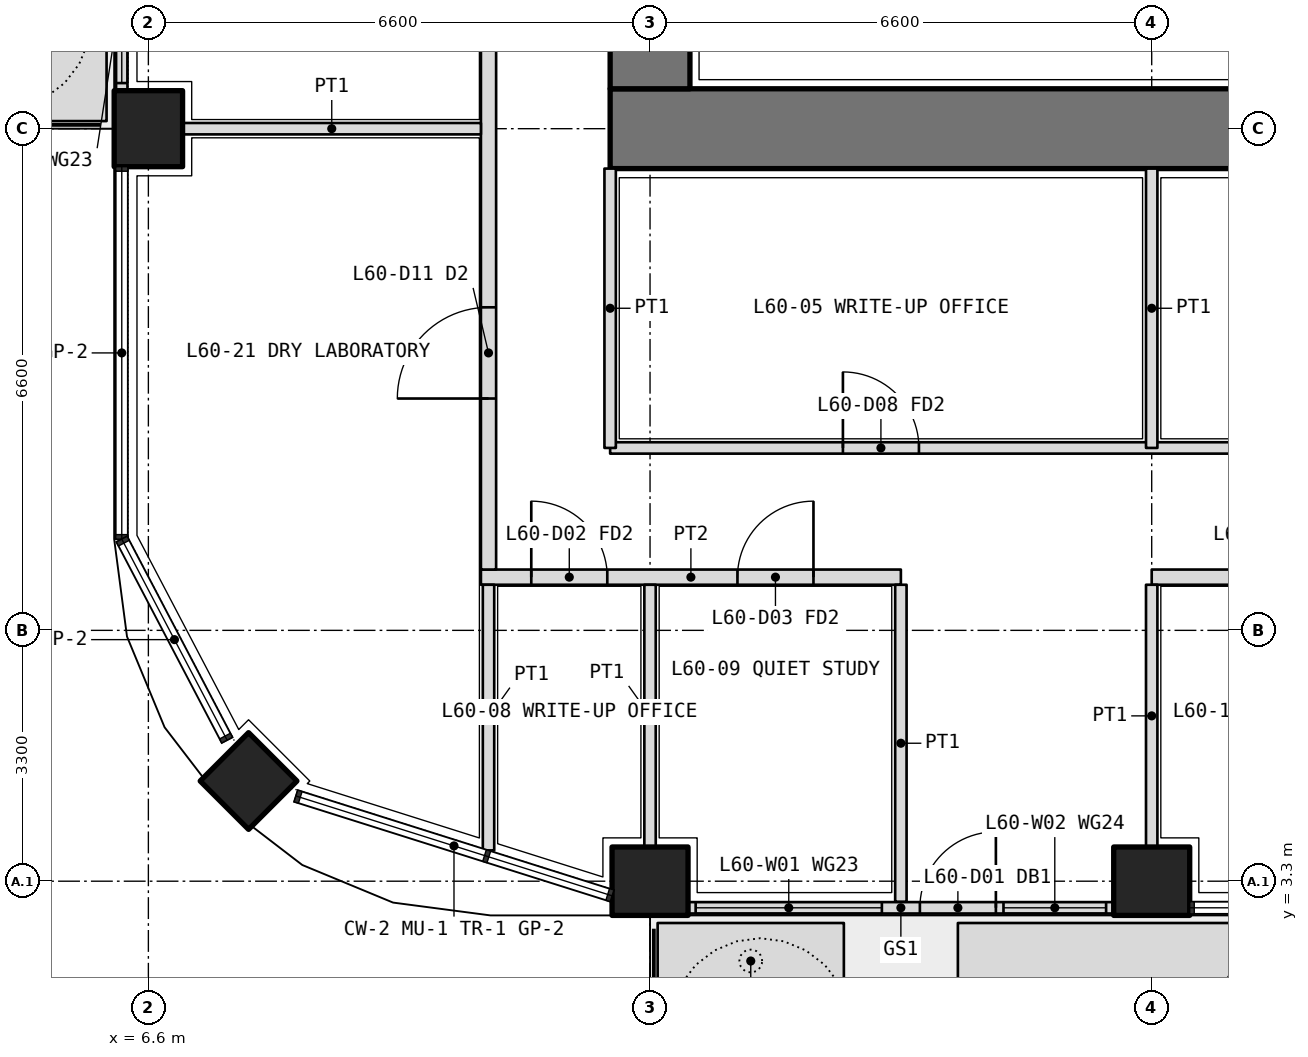
"""IFC4 building model, lengths in metres.
Left out: names, types, materials, properties, quantities, classifications, styles, units other than length and angle.
Written with IfcOpenShell. Run it as: python <this file> out.ifc"""

import sys

from ifc_helpers import new_model, si_unit, direction, frame, frame_2d, origin, origin_2d, place, context, subcontext, project, spatial, polyline, rectangle, outline, extrude, element, fill, save


model = new_model("IFC4")
c1 = context("Model", 3, precision=1e-05, world=origin(), true_north=direction((0.0, 1.0)))
c2 = subcontext(c1, "Body", "Model", "MODEL_VIEW")
j1 = project(units=[si_unit("LENGTHUNIT", "METRE"), si_unit("PLANEANGLEUNIT", "RADIAN")], contexts=[c1])
p1 = place(None, origin())
s1 = spatial("IfcSite", under=j1, at=p1, CompositionType="ELEMENT")
p2 = place(p1, origin())
s2 = spatial("IfcBuilding", under=s1, at=p2, CompositionType="ELEMENT")
p3 = place(p2, frame((0.0, 0.0, 262.8)))
s3 = spatial("IfcBuildingStorey", under=s2, at=p3, CompositionType="ELEMENT", Elevation=262.8)
p4 = place(p3, frame((7.918, 4.618, 0.0), z_axis=(0.0, 0.0, 1.0), x_axis=(0.707106781187, 0.707106781187, 0.0)))
e1 = element("IfcColumn", 1, at=p4, inside=s3, PredefinedType="COLUMN", context=c2, shape_type="SweptSolid", body=[
    extrude(rectangle(XDim=0.9, YDim=0.9, at=origin_2d()), origin(), (0.0, 0.0, 1.0), 4.2),
])
for number, where, z_axis, x_axis in (
    (2, (13.2, 3.3, 0.0), (0.0, 0.0, 1.0), (1.0, 0.0, 0.0)),
    (3, (19.8, 3.3, 0.0), (0.0, 0.0, 1.0), (1.0, 0.0, 0.0)),
    (4, (6.6, 13.2, 0.0), (0.0, 0.0, 1.0), (0.0, 1.0, 0.0)),
):
    element("IfcColumn", number, at=place(p3, frame(where, z_axis=z_axis, x_axis=x_axis)), inside=s3, PredefinedType="COLUMN", context=c2, shape_type="SweptSolid", body=[
        extrude(rectangle(XDim=1.0, YDim=0.9, at=origin_2d()), origin(), (0.0, 0.0, 1.0), 4.2),
    ])
p5 = place(p3, origin())
e5 = element("IfcWall", 5, at=p5, inside=s3, PredefinedType="USERDEFINED", context=c2, shape_type="SweptSolid", body=[
    extrude(outline(polyline([(13.3, 1.75), (15.75, 1.75), (15.75, 2.75), (13.3, 2.75), (13.3, 1.75)]), holes=[polyline([(13.45, 1.9), (15.6, 1.9), (15.6, 2.6), (13.45, 2.6), (13.45, 1.9)])]), origin(), (0.0, 0.0, 1.0), 1.05),
])
p6 = place(p3, origin())
e6 = element("IfcWall", 6, at=p6, inside=s3, PredefinedType="USERDEFINED", context=c2, shape_type="SweptSolid", body=[
    extrude(outline(polyline([(17.25, 1.75), (26.3, 1.75), (26.3, 2.75), (17.25, 2.75), (17.25, 1.75)]), holes=[polyline([(17.4, 1.9), (26.15, 1.9), (26.15, 2.6), (17.4, 2.6), (17.4, 1.9)])]), origin(), (0.0, 0.0, 1.0), 1.05),
])
p7 = place(p3, origin())
e7 = element("IfcWall", 7, at=p7, inside=s3, PredefinedType="USERDEFINED", context=c2, shape_type="SweptSolid", body=[
    extrude(outline(polyline([(5.05, 13.3), (6.05, 13.3), (6.05, 15.75), (5.05, 15.75), (5.05, 13.3)]), holes=[polyline([(5.2, 13.45), (5.9, 13.45), (5.9, 15.6), (5.2, 15.6), (5.2, 13.45)])]), origin(), (0.0, 0.0, 1.0), 1.05),
])
p8 = place(p3, frame((13.7, 2.95, 0.0), z_axis=(0.0, 0.0, 1.0), x_axis=(1.0, 0.0, 0.0)))
e8 = element("IfcWall", 8, at=p8, inside=s3, PredefinedType="SOLIDWALL", context=c2, shape_type="SweptSolid", body=[
    extrude(rectangle(XDim=5.6, YDim=0.15, at=frame_2d((2.8, 0.0))), origin(), (0.0, 0.0, 1.0), 2.7),
])
p9 = place(p8, frame((3.05, 0.0, 0.0)))
e9 = element("IfcOpeningElement", 9, at=p9, cuts=e8, PredefinedType="OPENING", context=c2, shape_type="SweptSolid", body=[
    extrude(rectangle(XDim=1.0, YDim=2.4, at=frame_2d((0.5, 1.2))), frame((0.0, 0.085, 0.0), z_axis=(0.0, -1.0, 0.0), x_axis=(1.0, 0.0, 0.0)), (0.0, 0.0, 1.0), 0.17),
])
p10 = place(p8, frame((0.1, 0.0, 0.1)))
e10 = element("IfcOpeningElement", 10, at=p10, cuts=e8, PredefinedType="OPENING", context=c2, shape_type="SweptSolid", body=[
    extrude(rectangle(XDim=2.45, YDim=2.3, at=frame_2d((1.225, 1.15))), frame((0.0, 0.085, 0.0), z_axis=(0.0, -1.0, 0.0), x_axis=(1.0, 0.0, 0.0)), (0.0, 0.0, 1.0), 0.17),
])
p11 = place(p8, frame((4.15, 0.0, 0.1)))
e11 = element("IfcOpeningElement", 11, at=p11, cuts=e8, PredefinedType="OPENING", context=c2, shape_type="SweptSolid", body=[
    extrude(rectangle(XDim=1.35, YDim=2.3, at=frame_2d((0.675, 1.15))), frame((0.0, 0.085, 0.0), z_axis=(0.0, -1.0, 0.0), x_axis=(1.0, 0.0, 0.0)), (0.0, 0.0, 1.0), 0.17),
])
p12 = place(p3, frame((6.25, 19.3, 0.0), z_axis=(0.0, 0.0, 1.0), x_axis=(0.0, -1.0, 0.0)))
e12 = element("IfcWall", 12, at=p12, inside=s3, PredefinedType="SOLIDWALL", context=c2, shape_type="SweptSolid", body=[
    extrude(rectangle(XDim=5.6, YDim=0.15, at=frame_2d((2.8, 0.0))), origin(), (0.0, 0.0, 1.0), 2.7),
])
p13 = place(p12, frame((1.55, 0.0, 0.0)))
e13 = element("IfcOpeningElement", 13, at=p13, cuts=e12, PredefinedType="OPENING", context=c2, shape_type="SweptSolid", body=[
    extrude(rectangle(XDim=1.0, YDim=2.4, at=frame_2d((0.5, 1.2))), frame((0.0, 0.085, 0.0), z_axis=(0.0, -1.0, 0.0), x_axis=(1.0, 0.0, 0.0)), (0.0, 0.0, 1.0), 0.17),
])
p14 = place(p12, frame((0.1, 0.0, 0.1)))
e14 = element("IfcOpeningElement", 14, at=p14, cuts=e12, PredefinedType="OPENING", context=c2, shape_type="SweptSolid", body=[
    extrude(rectangle(XDim=1.35, YDim=2.3, at=frame_2d((0.675, 1.15))), frame((0.0, 0.085, 0.0), z_axis=(0.0, -1.0, 0.0), x_axis=(1.0, 0.0, 0.0)), (0.0, 0.0, 1.0), 0.17),
])
p15 = place(p12, frame((3.05, 0.0, 0.1)))
e15 = element("IfcOpeningElement", 15, at=p15, cuts=e12, PredefinedType="OPENING", context=c2, shape_type="SweptSolid", body=[
    extrude(rectangle(XDim=2.45, YDim=2.3, at=frame_2d((1.225, 1.15))), frame((0.0, 0.085, 0.0), z_axis=(0.0, -1.0, 0.0), x_axis=(1.0, 0.0, 0.0)), (0.0, 0.0, 1.0), 0.17),
])
p16 = place(p3, frame((12.675, 13.2, 0.0), z_axis=(0.0, 0.0, 1.0), x_axis=(1.0, 0.0, 0.0)))
e16 = element("IfcWall", 16, at=p16, inside=s3, PredefinedType="SHEAR", context=c2, shape_type="SweptSolid", body=[
    extrude(rectangle(XDim=27.45, YDim=1.05, at=frame_2d((13.725, 0.0))), origin(), (0.0, 0.0, 1.0), 4.2),
])
p17 = place(p3, frame((13.2, 32.475, 0.0), z_axis=(0.0, 0.0, 1.0), x_axis=(0.0, -1.0, 0.0)))
e17 = element("IfcWall", 17, at=p17, inside=s3, PredefinedType="SHEAR", context=c2, shape_type="SweptSolid", body=[
    extrude(rectangle(XDim=18.75, YDim=1.05, at=frame_2d((9.375, 0.0))), origin(), (0.0, 0.0, 1.0), 4.2),
])
p18 = place(p17, frame((14.125, 0.0, 0.0)))
e18 = element("IfcOpeningElement", 18, at=p18, cuts=e17, PredefinedType="OPENING", context=c2, shape_type="SweptSolid", body=[
    extrude(rectangle(XDim=1.6, YDim=2.1, at=frame_2d((0.8, 1.05))), frame((0.0, 0.535, 0.0), z_axis=(0.0, -1.0, 0.0), x_axis=(1.0, 0.0, 0.0)), (0.0, 0.0, 1.0), 1.07),
])
p19 = place(p17, frame((3.325, 0.0, 0.0)))
e19 = element("IfcOpeningElement", 19, at=p19, cuts=e17, PredefinedType="OPENING", context=c2, shape_type="SweptSolid", body=[
    extrude(rectangle(XDim=1.6, YDim=2.1, at=frame_2d((0.8, 1.05))), frame((0.0, 0.535, 0.0), z_axis=(0.0, -1.0, 0.0), x_axis=(1.0, 0.0, 0.0)), (0.0, 0.0, 1.0), 1.07),
])
p20 = place(p3, frame((12.675, 9.0, 0.0), z_axis=(0.0, 0.0, 1.0), x_axis=(1.0, 0.0, 0.0)))
e20 = element("IfcWall", 20, at=p20, inside=s3, PredefinedType="PARTITIONING", context=c2, shape_type="SweptSolid", body=[
    extrude(rectangle(XDim=27.45, YDim=0.15, at=frame_2d((13.725, 0.0))), origin(), (0.0, 0.0, 1.0), 3.0),
])
p21 = place(p20, frame((3.062, 0.0, 0.0)))
e21 = element("IfcOpeningElement", 21, at=p21, cuts=e20, PredefinedType="OPENING", context=c2, shape_type="SweptSolid", body=[
    extrude(rectangle(XDim=1.0, YDim=2.1, at=frame_2d((0.5, 1.05))), frame((0.0, 0.085, 0.0), z_axis=(0.0, -1.0, 0.0), x_axis=(1.0, 0.0, 0.0)), (0.0, 0.0, 1.0), 0.17),
])
p22 = place(p20, frame((13.225, 0.0, 0.0)))
e22 = element("IfcOpeningElement", 22, at=p22, cuts=e20, PredefinedType="OPENING", context=c2, shape_type="SweptSolid", body=[
    extrude(rectangle(XDim=1.0, YDim=2.1, at=frame_2d((0.5, 1.05))), frame((0.0, 0.085, 0.0), z_axis=(0.0, -1.0, 0.0), x_axis=(1.0, 0.0, 0.0)), (0.0, 0.0, 1.0), 0.17),
])
p23 = place(p20, frame((23.387, 0.0, 0.0)))
e23 = element("IfcOpeningElement", 23, at=p23, cuts=e20, PredefinedType="OPENING", context=c2, shape_type="SweptSolid", body=[
    extrude(rectangle(XDim=1.0, YDim=2.1, at=frame_2d((0.5, 1.05))), frame((0.0, 0.085, 0.0), z_axis=(0.0, -1.0, 0.0), x_axis=(1.0, 0.0, 0.0)), (0.0, 0.0, 1.0), 0.17),
])
for number, where, z_axis, x_axis in (
    (24, (12.675, 12.675, 0.0), (0.0, 0.0, 1.0), (0.0, -1.0, 0.0)),
    (25, (19.8, 12.675, 0.0), (0.0, 0.0, 1.0), (0.0, -1.0, 0.0)),
):
    element("IfcWall", number, at=place(p3, frame(where, z_axis=z_axis, x_axis=x_axis)), inside=s3, PredefinedType="PARTITIONING", context=c2, shape_type="SweptSolid", body=[
        extrude(rectangle(XDim=3.675, YDim=0.15, at=frame_2d((1.837, 0.0))), origin(), (0.0, 0.0, 1.0), 3.0),
    ])
p24 = place(p3, frame((10.975, 7.3, 0.0), z_axis=(0.0, 0.0, 1.0), x_axis=(1.0, 0.0, 0.0)))
e26 = element("IfcWall", 26, at=p24, inside=s3, PredefinedType="PARTITIONING", context=c2, shape_type="SweptSolid", body=[
    extrude(rectangle(XDim=5.525, YDim=0.2, at=frame_2d((2.762, 0.0))), origin(), (0.0, 0.0, 1.0), 3.0),
])
p25 = place(p24, frame((0.663, 0.0, 0.0)))
e27 = element("IfcOpeningElement", 27, at=p25, cuts=e26, PredefinedType="OPENING", context=c2, shape_type="SweptSolid", body=[
    extrude(rectangle(XDim=1.0, YDim=2.1, at=frame_2d((0.5, 1.05))), frame((0.0, 0.11, 0.0), z_axis=(0.0, -1.0, 0.0), x_axis=(1.0, 0.0, 0.0)), (0.0, 0.0, 1.0), 0.22),
])
p26 = place(p24, frame((3.375, 0.0, 0.0)))
e28 = element("IfcOpeningElement", 28, at=p26, cuts=e26, PredefinedType="OPENING", context=c2, shape_type="SweptSolid", body=[
    extrude(rectangle(XDim=1.0, YDim=2.1, at=frame_2d((0.5, 1.05))), frame((0.0, 0.11, 0.0), z_axis=(0.0, -1.0, 0.0), x_axis=(1.0, 0.0, 0.0)), (0.0, 0.0, 1.0), 0.22),
])
p27 = place(p3, frame((19.8, 7.3, 0.0), z_axis=(0.0, 0.0, 1.0), x_axis=(1.0, 0.0, 0.0)))
e29 = element("IfcWall", 29, at=p27, inside=s3, PredefinedType="PARTITIONING", context=c2, shape_type="SweptSolid", body=[
    extrude(rectangle(XDim=22.025, YDim=0.2, at=frame_2d((11.012, 0.0))), origin(), (0.0, 0.0, 1.0), 3.0),
])
p28 = place(p27, frame((1.15, 0.0, 0.0)))
e30 = element("IfcOpeningElement", 30, at=p28, cuts=e29, PredefinedType="OPENING", context=c2, shape_type="SweptSolid", body=[
    extrude(rectangle(XDim=1.0, YDim=2.1, at=frame_2d((0.5, 1.05))), frame((0.0, 0.11, 0.0), z_axis=(0.0, -1.0, 0.0), x_axis=(1.0, 0.0, 0.0)), (0.0, 0.0, 1.0), 0.22),
])
p29 = place(p27, frame((4.9, 0.0, 0.0)))
e31 = element("IfcOpeningElement", 31, at=p29, cuts=e29, PredefinedType="OPENING", context=c2, shape_type="SweptSolid", body=[
    extrude(rectangle(XDim=1.0, YDim=2.1, at=frame_2d((0.5, 1.05))), frame((0.0, 0.11, 0.0), z_axis=(0.0, -1.0, 0.0), x_axis=(1.0, 0.0, 0.0)), (0.0, 0.0, 1.0), 0.22),
])
p30 = place(p27, frame((8.2, 0.0, 0.0)))
e32 = element("IfcOpeningElement", 32, at=p30, cuts=e29, PredefinedType="OPENING", context=c2, shape_type="SweptSolid", body=[
    extrude(rectangle(XDim=1.0, YDim=2.1, at=frame_2d((0.5, 1.05))), frame((0.0, 0.11, 0.0), z_axis=(0.0, -1.0, 0.0), x_axis=(1.0, 0.0, 0.0)), (0.0, 0.0, 1.0), 0.22),
])
p31 = place(p27, frame((15.413, 0.0, 0.0)))
e33 = element("IfcOpeningElement", 33, at=p31, cuts=e29, PredefinedType="OPENING", context=c2, shape_type="SweptSolid", body=[
    extrude(rectangle(XDim=1.0, YDim=2.1, at=frame_2d((0.5, 1.05))), frame((0.0, 0.11, 0.0), z_axis=(0.0, -1.0, 0.0), x_axis=(1.0, 0.0, 0.0)), (0.0, 0.0, 1.0), 0.22),
])
p32 = place(p3, frame((11.075, 7.4, 0.0), z_axis=(0.0, 0.0, 1.0), x_axis=(0.0, 1.0, 0.0)))
e34 = element("IfcWall", 34, at=p32, inside=s3, PredefinedType="PARTITIONING", context=c2, shape_type="SweptSolid", body=[
    extrude(rectangle(XDim=31.4, YDim=0.2, at=frame_2d((15.7, 0.0))), origin(), (0.0, 0.0, 1.0), 3.0),
])
p33 = place(p32, frame((2.25, 0.0, 0.0)))
e35 = element("IfcOpeningElement", 35, at=p33, cuts=e34, PredefinedType="OPENING", context=c2, shape_type="SweptSolid", body=[
    extrude(rectangle(XDim=1.2, YDim=2.1, at=frame_2d((0.6, 1.05))), frame((0.0, 0.11, 0.0), z_axis=(0.0, -1.0, 0.0), x_axis=(1.0, 0.0, 0.0)), (0.0, 0.0, 1.0), 0.22),
])
p34 = place(p32, frame((6.9, 0.0, 0.0)))
e36 = element("IfcOpeningElement", 36, at=p34, cuts=e34, PredefinedType="OPENING", context=c2, shape_type="SweptSolid", body=[
    extrude(rectangle(XDim=1.0, YDim=2.1, at=frame_2d((0.5, 1.05))), frame((0.0, 0.11, 0.0), z_axis=(0.0, -1.0, 0.0), x_axis=(1.0, 0.0, 0.0)), (0.0, 0.0, 1.0), 0.22),
])
p35 = place(p32, frame((10.35, 0.0, 0.0)))
e37 = element("IfcOpeningElement", 37, at=p35, cuts=e34, PredefinedType="OPENING", context=c2, shape_type="SweptSolid", body=[
    extrude(rectangle(XDim=0.9, YDim=2.1, at=frame_2d((0.45, 1.05))), frame((0.0, 0.11, 0.0), z_axis=(0.0, -1.0, 0.0), x_axis=(1.0, 0.0, 0.0)), (0.0, 0.0, 1.0), 0.22),
])
p36 = place(p32, frame((13.7, 0.0, 0.0)))
e38 = element("IfcOpeningElement", 38, at=p36, cuts=e34, PredefinedType="OPENING", context=c2, shape_type="SweptSolid", body=[
    extrude(rectangle(XDim=0.9, YDim=2.1, at=frame_2d((0.45, 1.05))), frame((0.0, 0.11, 0.0), z_axis=(0.0, -1.0, 0.0), x_axis=(1.0, 0.0, 0.0)), (0.0, 0.0, 1.0), 0.22),
])
p37 = place(p32, frame((16.85, 0.0, 0.0)))
e39 = element("IfcOpeningElement", 39, at=p37, cuts=e34, PredefinedType="OPENING", context=c2, shape_type="SweptSolid", body=[
    extrude(rectangle(XDim=1.0, YDim=2.1, at=frame_2d((0.5, 1.05))), frame((0.0, 0.11, 0.0), z_axis=(0.0, -1.0, 0.0), x_axis=(1.0, 0.0, 0.0)), (0.0, 0.0, 1.0), 0.22),
])
p38 = place(p32, frame((24.75, 0.0, 0.0)))
e40 = element("IfcOpeningElement", 40, at=p38, cuts=e34, PredefinedType="OPENING", context=c2, shape_type="SweptSolid", body=[
    extrude(rectangle(XDim=1.0, YDim=2.1, at=frame_2d((0.5, 1.05))), frame((0.0, 0.11, 0.0), z_axis=(0.0, -1.0, 0.0), x_axis=(1.0, 0.0, 0.0)), (0.0, 0.0, 1.0), 0.22),
])
p39 = place(p3, frame((11.075, 3.705, 0.0), z_axis=(0.0, 0.0, 1.0), x_axis=(0.0, 1.0, 0.0)))
e41 = element("IfcWall", 41, at=p39, inside=s3, PredefinedType="PARTITIONING", context=c2, shape_type="SweptSolid", body=[
    extrude(rectangle(XDim=3.495, YDim=0.15, at=frame_2d((1.748, 0.0))), origin(), (0.0, 0.0, 1.0), 2.7),
])
p40 = place(p3, frame((13.2, 3.75, 0.0), z_axis=(0.0, 0.0, 1.0), x_axis=(0.0, 1.0, 0.0)))
e42 = element("IfcWall", 42, at=p40, inside=s3, PredefinedType="PARTITIONING", context=c2, shape_type="SweptSolid", body=[
    extrude(rectangle(XDim=3.45, YDim=0.15, at=frame_2d((1.725, 0.0))), origin(), (0.0, 0.0, 1.0), 3.0),
])
p41 = place(p3, frame((16.5, 3.03, 0.0), z_axis=(0.0, 0.0, 1.0), x_axis=(0.0, 1.0, 0.0)))
e43 = element("IfcWall", 43, at=p41, inside=s3, PredefinedType="PARTITIONING", context=c2, shape_type="SweptSolid", body=[
    extrude(rectangle(XDim=4.17, YDim=0.15, at=frame_2d((2.085, 0.0))), origin(), (0.0, 0.0, 1.0), 2.7),
])
p42 = place(p3, frame((19.8, 3.75, 0.0), z_axis=(0.0, 0.0, 1.0), x_axis=(0.0, 1.0, 0.0)))
e44 = element("IfcWall", 44, at=p42, inside=s3, PredefinedType="PARTITIONING", context=c2, shape_type="SweptSolid", body=[
    extrude(rectangle(XDim=3.45, YDim=0.15, at=frame_2d((1.725, 0.0))), origin(), (0.0, 0.0, 1.0), 3.0),
])
p43 = place(p3, frame((7.05, 13.2, 0.0), z_axis=(0.0, 0.0, 1.0), x_axis=(1.0, 0.0, 0.0)))
e45 = element("IfcWall", 45, at=p43, inside=s3, PredefinedType="PARTITIONING", context=c2, shape_type="SweptSolid", body=[
    extrude(rectangle(XDim=3.925, YDim=0.15, at=frame_2d((1.962, 0.0))), origin(), (0.0, 0.0, 1.0), 3.0),
])
p44 = place(p9, origin())
e46 = element("IfcDoor", 46, at=p44, inside=s3, OperationType="SINGLE_SWING_RIGHT", PredefinedType="DOOR", context=c2, shape_type="SweptSolid", body=[
    extrude(rectangle(XDim=1.0, YDim=2.4, at=frame_2d((0.5, 1.2))), frame((0.0, 0.025, 0.0), z_axis=(0.0, -1.0, 0.0), x_axis=(1.0, 0.0, 0.0)), (0.0, 0.0, 1.0), 0.05),
])
fill(e9, e46)
p45 = place(p10, origin())
e47 = element("IfcWindow", 47, at=p45, inside=s3, PartitioningType="SINGLE_PANEL", PredefinedType="WINDOW", context=c2, shape_type="SweptSolid", body=[
    extrude(rectangle(XDim=2.45, YDim=2.3, at=frame_2d((1.225, 1.15))), frame((0.0, 0.03, 0.0), z_axis=(0.0, -1.0, 0.0), x_axis=(1.0, 0.0, 0.0)), (0.0, 0.0, 1.0), 0.06),
])
fill(e10, e47)
p46 = place(p11, origin())
e48 = element("IfcWindow", 48, at=p46, inside=s3, PartitioningType="SINGLE_PANEL", PredefinedType="WINDOW", context=c2, shape_type="SweptSolid", body=[
    extrude(rectangle(XDim=1.35, YDim=2.3, at=frame_2d((0.675, 1.15))), frame((0.0, 0.03, 0.0), z_axis=(0.0, -1.0, 0.0), x_axis=(1.0, 0.0, 0.0)), (0.0, 0.0, 1.0), 0.06),
])
fill(e11, e48)
p47 = place(p15, origin())
e49 = element("IfcWindow", 49, at=p47, inside=s3, PartitioningType="SINGLE_PANEL", PredefinedType="WINDOW", context=c2, shape_type="SweptSolid", body=[
    extrude(rectangle(XDim=2.45, YDim=2.3, at=frame_2d((1.225, 1.15))), frame((0.0, 0.03, 0.0), z_axis=(0.0, -1.0, 0.0), x_axis=(1.0, 0.0, 0.0)), (0.0, 0.0, 1.0), 0.06),
])
fill(e15, e49)
p48 = place(p21, origin())
e50 = element("IfcDoor", 50, at=p48, inside=s3, OperationType="SINGLE_SWING_LEFT", PredefinedType="DOOR", context=c2, shape_type="SweptSolid", body=[
    extrude(rectangle(XDim=1.0, YDim=2.1, at=frame_2d((0.5, 1.05))), frame((0.0, 0.025, 0.0), z_axis=(0.0, -1.0, 0.0), x_axis=(1.0, 0.0, 0.0)), (0.0, 0.0, 1.0), 0.05),
])
fill(e21, e50)
p49 = place(p25, origin())
e51 = element("IfcDoor", 51, at=p49, inside=s3, OperationType="SINGLE_SWING_LEFT", PredefinedType="DOOR", context=c2, shape_type="SweptSolid", body=[
    extrude(rectangle(XDim=1.0, YDim=2.1, at=frame_2d((0.5, 1.05))), frame((0.0, 0.025, 0.0), z_axis=(0.0, -1.0, 0.0), x_axis=(1.0, 0.0, 0.0)), (0.0, 0.0, 1.0), 0.05),
])
fill(e27, e51)
p50 = place(p26, origin())
e52 = element("IfcDoor", 52, at=p50, inside=s3, OperationType="SINGLE_SWING_RIGHT", PredefinedType="DOOR", context=c2, shape_type="SweptSolid", body=[
    extrude(rectangle(XDim=1.0, YDim=2.1, at=frame_2d((0.5, 1.05))), frame((0.0, 0.025, 0.0), z_axis=(0.0, -1.0, 0.0), x_axis=(1.0, 0.0, 0.0)), (0.0, 0.0, 1.0), 0.05),
])
fill(e28, e52)
p51 = place(p33, origin())
e53 = element("IfcDoor", 53, at=p51, inside=s3, OperationType="DOUBLE_DOOR_SINGLE_SWING", PredefinedType="DOOR", context=c2, shape_type="SweptSolid", body=[
    extrude(rectangle(XDim=1.2, YDim=2.1, at=frame_2d((0.6, 1.05))), frame((0.0, 0.025, 0.0), z_axis=(0.0, -1.0, 0.0), x_axis=(1.0, 0.0, 0.0)), (0.0, 0.0, 1.0), 0.05),
])
fill(e35, e53)
save(model, sys.argv[1])
